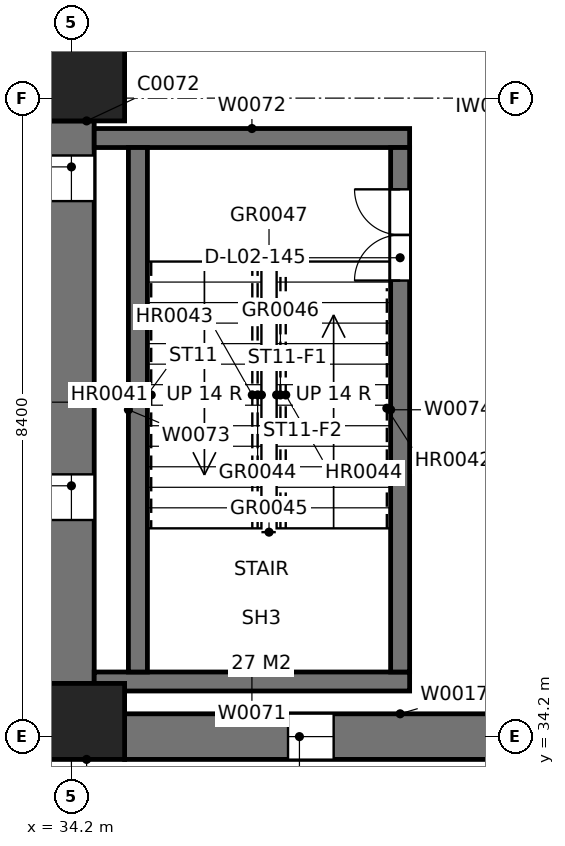
"""IFC4 building model, lengths in metres.
Left out: names, types, materials, properties, quantities, classifications, styles, units other than length and angle.
Written with IfcOpenShell. Run it as: python <this file> out.ifc"""

import sys

from ifc_helpers import new_model, si_unit, direction, frame, frame_2d, origin, origin_2d, place, context, subcontext, project, spatial, rectangle, extrude, element, fill, save


model = new_model("IFC4")
c1 = context("Model", 3, precision=1e-05, world=origin(), true_north=direction((0.0, 1.0)))
c2 = subcontext(c1, "Body", "Model", "MODEL_VIEW")
j1 = project(units=[si_unit("LENGTHUNIT", "METRE"), si_unit("PLANEANGLEUNIT", "RADIAN")], contexts=[c1])
p1 = place(None, origin())
s1 = spatial("IfcSite", under=j1, at=p1, CompositionType="ELEMENT")
p2 = place(p1, origin())
s2 = spatial("IfcBuilding", under=s1, at=p2, CompositionType="ELEMENT")
p3 = place(p2, frame((0.0, 0.0, 9.6)))
s3 = spatial("IfcBuildingStorey", under=s2, at=p3, CompositionType="ELEMENT", Elevation=9.6)
for number, where, z_axis, x_axis in (
    (1, (34.4, 34.4, 0.0), (0.0, 0.0, 1.0), (1.0, 0.0, 0.0)),
    (2, (34.4, 42.8, 0.0), (0.0, 0.0, 1.0), (1.0, 0.0, 0.0)),
):
    element("IfcColumn", number, at=place(p3, frame(where, z_axis=z_axis, x_axis=x_axis)), inside=s3, PredefinedType="COLUMN", context=c2, shape_type="SweptSolid", body=[
        extrude(rectangle(XDim=1.0, YDim=1.0, at=origin_2d()), origin(), (0.0, 0.0, 1.0), 4.8),
    ])
p4 = place(p3, frame((34.2, 42.3, 0.0), z_axis=(0.0, 0.0, 1.0), x_axis=(0.0, -1.0, 0.0)))
e3 = element("IfcWall", 3, at=p4, inside=s3, PredefinedType="SOLIDWALL", context=c2, shape_type="SweptSolid", body=[
    extrude(rectangle(XDim=7.4, YDim=0.6, at=frame_2d((3.7, 0.0))), origin(), (0.0, 0.0, 1.0), 4.8),
])
p5 = place(p4, frame((4.65, 0.0, 1.5)))
e4 = element("IfcOpeningElement", 4, at=p5, cuts=e3, PredefinedType="OPENING", context=c2, shape_type="SweptSolid", body=[
    extrude(rectangle(XDim=0.6, YDim=1.8, at=frame_2d((0.3, 0.9))), frame((0.0, 0.31, 0.0), z_axis=(0.0, -1.0, 0.0), x_axis=(1.0, 0.0, 0.0)), (0.0, 0.0, 1.0), 0.62),
])
p6 = place(p4, frame((0.455, 0.0, 1.5)))
e5 = element("IfcOpeningElement", 5, at=p6, cuts=e3, PredefinedType="OPENING", context=c2, shape_type="SweptSolid", body=[
    extrude(rectangle(XDim=0.6, YDim=1.8, at=frame_2d((0.3, 0.9))), frame((0.0, 0.31, 0.0), z_axis=(0.0, -1.0, 0.0), x_axis=(1.0, 0.0, 0.0)), (0.0, 0.0, 1.0), 0.62),
])
p7 = place(p3, frame((34.9, 34.2, 0.0), z_axis=(0.0, 0.0, 1.0), x_axis=(1.0, 0.0, 0.0)))
e6 = element("IfcWall", 6, at=p7, inside=s3, PredefinedType="SOLIDWALL", context=c2, shape_type="SweptSolid", body=[
    extrude(rectangle(XDim=7.25, YDim=0.6, at=frame_2d((3.625, 0.0))), origin(), (0.0, 0.0, 1.0), 4.8),
])
p8 = place(p7, frame((2.15, 0.0, 1.5)))
e7 = element("IfcOpeningElement", 7, at=p8, cuts=e6, PredefinedType="OPENING", context=c2, shape_type="SweptSolid", body=[
    extrude(rectangle(XDim=0.6, YDim=1.8, at=frame_2d((0.3, 0.9))), frame((0.0, 0.31, 0.0), z_axis=(0.0, -1.0, 0.0), x_axis=(1.0, 0.0, 0.0)), (0.0, 0.0, 1.0), 0.62),
])
p9 = place(p7, frame((6.35, 0.0, 1.5)))
e8 = element("IfcOpeningElement", 8, at=p9, cuts=e6, PredefinedType="OPENING", context=c2, shape_type="SweptSolid", body=[
    extrude(rectangle(XDim=0.6, YDim=1.8, at=frame_2d((0.3, 0.9))), frame((0.0, 0.31, 0.0), z_axis=(0.0, -1.0, 0.0), x_axis=(1.0, 0.0, 0.0)), (0.0, 0.0, 1.0), 0.62),
])
for number, where, z_axis, x_axis in (
    (9, (34.5, 34.925, 0.0), (0.0, 0.0, 1.0), (1.0, 0.0, 0.0)),
    (10, (34.5, 42.075, 0.0), (0.0, 0.0, 1.0), (1.0, 0.0, 0.0)),
):
    element("IfcWall", number, at=place(p3, frame(where, z_axis=z_axis, x_axis=x_axis)), inside=s3, PredefinedType="SOLIDWALL", context=c2, shape_type="SweptSolid", body=[
        extrude(rectangle(XDim=4.15, YDim=0.25, at=frame_2d((2.075, 0.0))), origin(), (0.0, 0.0, 1.0), 4.8),
    ])
p10 = place(p3, frame((35.075, 35.05, 0.0), z_axis=(0.0, 0.0, 1.0), x_axis=(0.0, 1.0, 0.0)))
e11 = element("IfcWall", 11, at=p10, inside=s3, PredefinedType="SOLIDWALL", context=c2, shape_type="SweptSolid", body=[
    extrude(rectangle(XDim=6.9, YDim=0.25, at=frame_2d((3.45, 0.0))), origin(), (0.0, 0.0, 1.0), 4.8),
])
p11 = place(p3, frame((38.525, 35.05, 0.0), z_axis=(0.0, 0.0, 1.0), x_axis=(0.0, 1.0, 0.0)))
e12 = element("IfcWall", 12, at=p11, inside=s3, PredefinedType="SOLIDWALL", context=c2, shape_type="SweptSolid", body=[
    extrude(rectangle(XDim=6.9, YDim=0.25, at=frame_2d((3.45, 0.0))), origin(), (0.0, 0.0, 1.0), 4.8),
])
p12 = place(p11, frame((5.15, 0.0, 0.0)))
e13 = element("IfcOpeningElement", 13, at=p12, cuts=e12, PredefinedType="OPENING", context=c2, shape_type="SweptSolid", body=[
    extrude(rectangle(XDim=1.2, YDim=2.1, at=frame_2d((0.6, 1.05))), frame((0.0, 0.135, 0.0), z_axis=(0.0, -1.0, 0.0), x_axis=(1.0, 0.0, 0.0)), (0.0, 0.0, 1.0), 0.27),
])
p13 = place(p12, origin())
e14 = element("IfcDoor", 14, at=p13, inside=s3, OperationType="DOUBLE_DOOR_SINGLE_SWING", PredefinedType="DOOR", context=c2, shape_type="SweptSolid", body=[
    extrude(rectangle(XDim=1.2, YDim=2.1, at=frame_2d((0.6, 1.05))), frame((0.0, 0.025, 0.0), z_axis=(0.0, -1.0, 0.0), x_axis=(1.0, 0.0, 0.0)), (0.0, 0.0, 1.0), 0.05),
])
fill(e13, e14)
p14 = place(p5, origin())
e15 = element("IfcWindow", 15, at=p14, inside=s3, PartitioningType="SINGLE_PANEL", PredefinedType="WINDOW", context=c2, shape_type="SweptSolid", body=[
    extrude(rectangle(XDim=0.6, YDim=1.8, at=frame_2d((0.3, 0.9))), frame((0.0, 0.01, 0.0), z_axis=(0.0, -1.0, 0.0), x_axis=(1.0, 0.0, 0.0)), (0.0, 0.0, 1.0), 0.06),
])
fill(e4, e15)
p15 = place(p6, origin())
e16 = element("IfcWindow", 16, at=p15, inside=s3, PartitioningType="SINGLE_PANEL", PredefinedType="WINDOW", context=c2, shape_type="SweptSolid", body=[
    extrude(rectangle(XDim=0.6, YDim=1.8, at=frame_2d((0.3, 0.9))), frame((0.0, 0.01, 0.0), z_axis=(0.0, -1.0, 0.0), x_axis=(1.0, 0.0, 0.0)), (0.0, 0.0, 1.0), 0.06),
])
fill(e5, e16)
p16 = place(p8, origin())
e17 = element("IfcWindow", 17, at=p16, inside=s3, PartitioningType="SINGLE_PANEL", PredefinedType="WINDOW", context=c2, shape_type="SweptSolid", body=[
    extrude(rectangle(XDim=0.6, YDim=1.8, at=frame_2d((0.3, 0.9))), frame((0.0, 0.01, 0.0), z_axis=(0.0, -1.0, 0.0), x_axis=(1.0, 0.0, 0.0)), (0.0, 0.0, 1.0), 0.06),
])
fill(e7, e17)
save(model, sys.argv[1])
